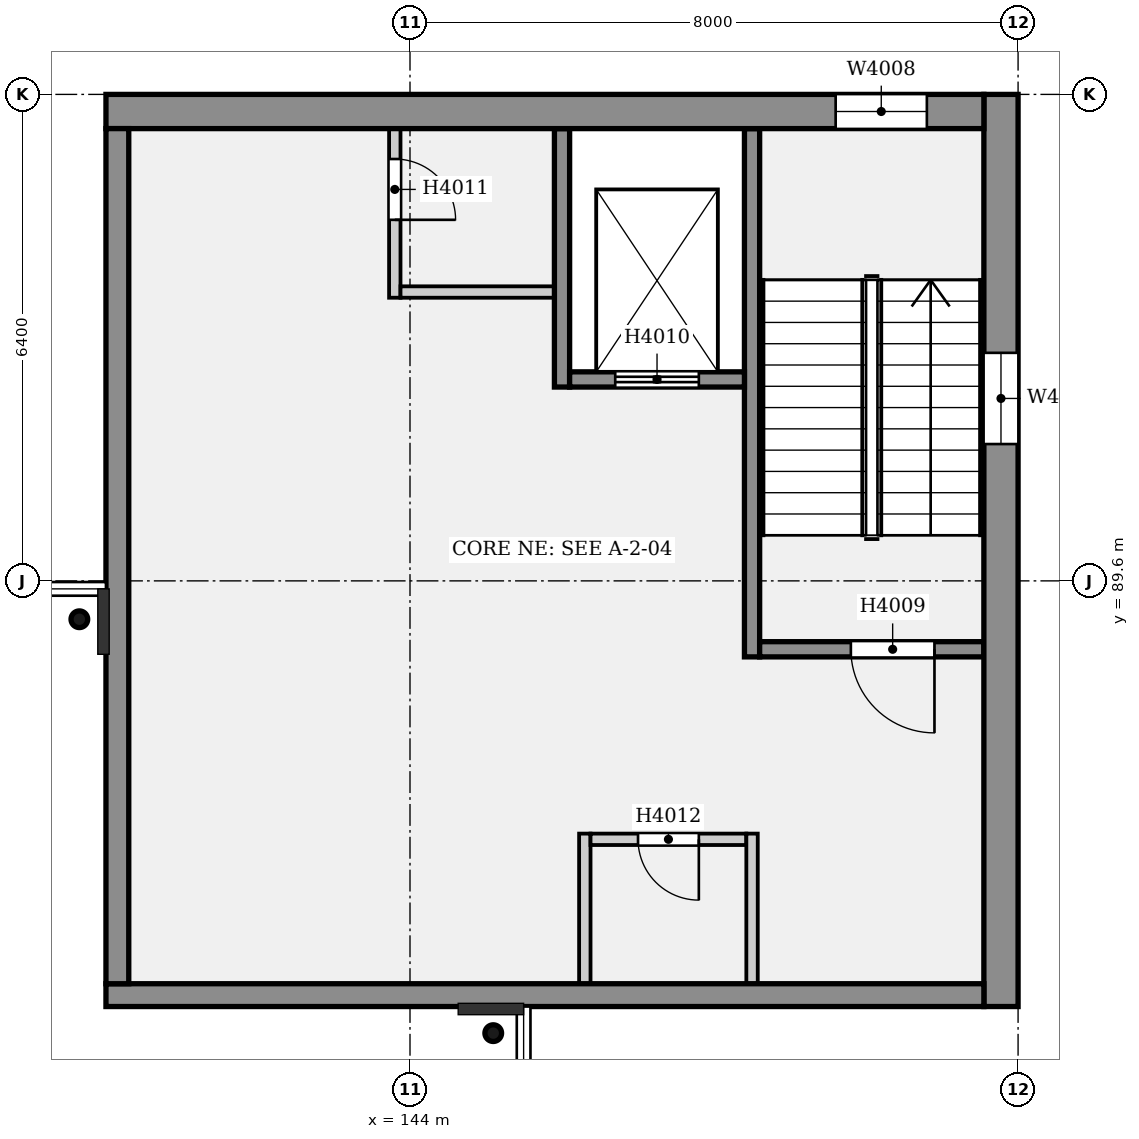
"""IFC4 building model, lengths in metres.
Left out: names, types, materials, properties, quantities, classifications, styles, units other than length and angle.
Written with IfcOpenShell. Run it as: python <this file> out.ifc"""

import sys

from ifc_helpers import new_model, si_unit, direction, frame, frame_2d, origin, origin_2d, place, context, subcontext, project, spatial, rectangle, hollow_circle, extrude, element, fill, save


model = new_model("IFC4")
c1 = context("Model", 3, precision=1e-05, world=origin(), true_north=direction((0.0, 1.0)))
c2 = subcontext(c1, "Body", "Model", "MODEL_VIEW")
j1 = project(units=[si_unit("LENGTHUNIT", "METRE"), si_unit("PLANEANGLEUNIT", "RADIAN")], contexts=[c1])
p1 = place(None, origin())
s1 = spatial("IfcSite", under=j1, at=p1, CompositionType="ELEMENT")
p2 = place(p1, origin())
s2 = spatial("IfcBuilding", under=s1, at=p2, CompositionType="ELEMENT")
p3 = place(p2, frame((0.0, 0.0, 18.2)))
s3 = spatial("IfcBuildingStorey", under=s2, at=p3, CompositionType="ELEMENT", Elevation=18.2)
p4 = place(p3, frame((151.775, 96.0, 0.0), z_axis=(0.0, 0.0, 1.0), x_axis=(0.0, -1.0, 0.0)))
e1 = element("IfcWall", 1, at=p4, inside=s3, PredefinedType="ELEMENTEDWALL", context=c2, shape_type="SweptSolid", body=[
    extrude(rectangle(XDim=12.0, YDim=0.45, at=frame_2d((6.0, 0.0))), origin(), (0.0, 0.0, 1.0), 4.4),
])
p5 = place(p4, frame((3.4, 0.0, 0.6)))
e2 = element("IfcOpeningElement", 2, at=p5, cuts=e1, PredefinedType="OPENING", context=c2, shape_type="SweptSolid", body=[
    extrude(rectangle(XDim=1.2, YDim=3.0, at=frame_2d((0.6, 1.5))), frame((0.0, 0.235, 0.0), z_axis=(0.0, -1.0, 0.0), x_axis=(1.0, 0.0, 0.0)), (0.0, 0.0, 1.0), 0.47),
])
p6 = place(p3, frame((151.55, 95.775, 0.0), z_axis=(0.0, 0.0, 1.0), x_axis=(-1.0, 0.0, 0.0)))
e3 = element("IfcWall", 3, at=p6, inside=s3, PredefinedType="ELEMENTEDWALL", context=c2, shape_type="SweptSolid", body=[
    extrude(rectangle(XDim=11.55, YDim=0.45, at=frame_2d((5.775, 0.0))), origin(), (0.0, 0.0, 1.0), 4.4),
])
p7 = place(p6, frame((0.75, 0.0, 0.6)))
e4 = element("IfcOpeningElement", 4, at=p7, cuts=e3, PredefinedType="OPENING", context=c2, shape_type="SweptSolid", body=[
    extrude(rectangle(XDim=1.2, YDim=3.0, at=frame_2d((0.6, 1.5))), frame((0.0, 0.235, 0.0), z_axis=(0.0, -1.0, 0.0), x_axis=(1.0, 0.0, 0.0)), (0.0, 0.0, 1.0), 0.47),
])
p8 = place(p3, frame((140.15, 95.55, 0.0), z_axis=(0.0, 0.0, 1.0), x_axis=(0.0, -1.0, 0.0)))
e5 = element("IfcWall", 5, at=p8, inside=s3, PredefinedType="SOLIDWALL", context=c2, shape_type="SweptSolid", body=[
    extrude(rectangle(XDim=11.25, YDim=0.3, at=frame_2d((5.625, 0.0))), origin(), (0.0, 0.0, 1.0), 4.4),
])
p9 = place(p3, frame((151.55, 84.15, 0.0), z_axis=(0.0, 0.0, 1.0), x_axis=(-1.0, 0.0, 0.0)))
e6 = element("IfcWall", 6, at=p9, inside=s3, PredefinedType="SOLIDWALL", context=c2, shape_type="SweptSolid", body=[
    extrude(rectangle(XDim=11.55, YDim=0.3, at=frame_2d((5.775, 0.0))), origin(), (0.0, 0.0, 1.0), 4.4),
])
for number, where, z_axis, x_axis in (
    (7, (139.65, 89.095, 0.0), (0.0, -0.199, 0.98), (1.0, 0.0, 0.0)),
    (8, (145.095, 83.65, 0.0), (-0.199, 0.0, 0.98), (0.0, -1.0, 0.0)),
):
    element("IfcColumn", number, at=place(p3, frame(where, z_axis=z_axis, x_axis=x_axis)), inside=s3, PredefinedType="COLUMN", context=c2, shape_type="SweptSolid", body=[
        extrude(hollow_circle(Radius=0.11, WallThickness=0.013, at=origin_2d()), origin(), (0.0, 0.0, 1.0), 3.776),
    ])
p10 = place(p3, frame((148.5, 95.55, 0.0), z_axis=(0.0, 0.0, 1.0), x_axis=(0.0, -1.0, 0.0)))
e9 = element("IfcWall", 9, at=p10, inside=s3, PredefinedType="SOLIDWALL", context=c2, shape_type="SweptSolid", body=[
    extrude(rectangle(XDim=6.95, YDim=0.2, at=frame_2d((3.475, 0.0))), origin(), (0.0, 0.0, 1.0), 4.4),
])
p11 = place(p3, frame((151.55, 88.7, 0.0), z_axis=(0.0, 0.0, 1.0), x_axis=(-1.0, 0.0, 0.0)))
e10 = element("IfcWall", 10, at=p11, inside=s3, PredefinedType="SOLIDWALL", context=c2, shape_type="SweptSolid", body=[
    extrude(rectangle(XDim=2.95, YDim=0.2, at=frame_2d((1.475, 0.0))), origin(), (0.0, 0.0, 1.0), 4.4),
])
p12 = place(p11, frame((0.65, 0.0, 0.0)))
e11 = element("IfcOpeningElement", 11, at=p12, cuts=e10, PredefinedType="OPENING", context=c2, shape_type="SweptSolid", body=[
    extrude(rectangle(XDim=1.1, YDim=2.1, at=frame_2d((0.55, 1.05))), frame((0.0, 0.11, 0.0), z_axis=(0.0, -1.0, 0.0), x_axis=(1.0, 0.0, 0.0)), (0.0, 0.0, 1.0), 0.22),
])
p13 = place(p3, frame((146.0, 95.55, 0.0), z_axis=(0.0, 0.0, 1.0), x_axis=(0.0, -1.0, 0.0)))
e12 = element("IfcWall", 12, at=p13, inside=s3, PredefinedType="SOLIDWALL", context=c2, shape_type="SweptSolid", body=[
    extrude(rectangle(XDim=3.4, YDim=0.2, at=frame_2d((1.7, 0.0))), origin(), (0.0, 0.0, 1.0), 4.4),
])
p14 = place(p3, frame((148.4, 92.25, 0.0), z_axis=(0.0, 0.0, 1.0), x_axis=(-1.0, 0.0, 0.0)))
e13 = element("IfcWall", 13, at=p14, inside=s3, PredefinedType="SOLIDWALL", context=c2, shape_type="SweptSolid", body=[
    extrude(rectangle(XDim=2.3, YDim=0.2, at=frame_2d((1.15, 0.0))), origin(), (0.0, 0.0, 1.0), 4.4),
])
p15 = place(p14, frame((0.6, 0.0, 0.0)))
e14 = element("IfcOpeningElement", 14, at=p15, cuts=e13, PredefinedType="OPENING", context=c2, shape_type="SweptSolid", body=[
    extrude(rectangle(XDim=1.1, YDim=2.1, at=frame_2d((0.55, 1.05))), frame((0.0, 0.11, 0.0), z_axis=(0.0, -1.0, 0.0), x_axis=(1.0, 0.0, 0.0)), (0.0, 0.0, 1.0), 0.22),
])
p16 = place(p3, frame((145.9, 93.4, 0.0), z_axis=(0.0, 0.0, 1.0), x_axis=(-1.0, 0.0, 0.0)))
e15 = element("IfcWall", 15, at=p16, inside=s3, PredefinedType="PARTITIONING", context=c2, shape_type="SweptSolid", body=[
    extrude(rectangle(XDim=2.025, YDim=0.15, at=frame_2d((1.012, 0.0))), origin(), (0.0, 0.0, 1.0), 4.15),
])
p17 = place(p3, frame((143.8, 95.55, 0.0), z_axis=(0.0, 0.0, 1.0), x_axis=(0.0, -1.0, 0.0)))
e16 = element("IfcWall", 16, at=p17, inside=s3, PredefinedType="PARTITIONING", context=c2, shape_type="SweptSolid", body=[
    extrude(rectangle(XDim=2.225, YDim=0.15, at=frame_2d((1.113, 0.0))), origin(), (0.0, 0.0, 1.0), 4.15),
])
p18 = place(p17, frame((0.4, 0.0, 0.0)))
e17 = element("IfcOpeningElement", 17, at=p18, cuts=e16, PredefinedType="OPENING", context=c2, shape_type="SweptSolid", body=[
    extrude(rectangle(XDim=0.8, YDim=2.1, at=frame_2d((0.4, 1.05))), frame((0.0, 0.085, 0.0), z_axis=(0.0, -1.0, 0.0), x_axis=(1.0, 0.0, 0.0)), (0.0, 0.0, 1.0), 0.17),
])
p19 = place(p3, frame((148.425, 86.2, 0.0), z_axis=(0.0, 0.0, 1.0), x_axis=(-1.0, 0.0, 0.0)))
e18 = element("IfcWall", 18, at=p19, inside=s3, PredefinedType="PARTITIONING", context=c2, shape_type="SweptSolid", body=[
    extrude(rectangle(XDim=2.05, YDim=0.15, at=frame_2d((1.025, 0.0))), origin(), (0.0, 0.0, 1.0), 4.15),
])
p20 = place(p19, frame((0.625, 0.0, 0.0)))
e19 = element("IfcOpeningElement", 19, at=p20, cuts=e18, PredefinedType="OPENING", context=c2, shape_type="SweptSolid", body=[
    extrude(rectangle(XDim=0.8, YDim=2.1, at=frame_2d((0.4, 1.05))), frame((0.0, 0.085, 0.0), z_axis=(0.0, -1.0, 0.0), x_axis=(1.0, 0.0, 0.0)), (0.0, 0.0, 1.0), 0.17),
])
for number, where, z_axis, x_axis in (
    (20, (148.5, 86.275, 0.0), (0.0, 0.0, 1.0), (0.0, -1.0, 0.0)),
    (21, (146.3, 86.275, 0.0), (0.0, 0.0, 1.0), (0.0, -1.0, 0.0)),
):
    element("IfcWall", number, at=place(p3, frame(where, z_axis=z_axis, x_axis=x_axis)), inside=s3, PredefinedType="PARTITIONING", context=c2, shape_type="SweptSolid", body=[
        extrude(rectangle(XDim=1.975, YDim=0.15, at=frame_2d((0.987, 0.0))), origin(), (0.0, 0.0, 1.0), 4.15),
    ])
p21 = place(p12, origin())
e22 = element("IfcDoor", 22, at=p21, inside=s3, OperationType="SINGLE_SWING_LEFT", PredefinedType="DOOR", context=c2, shape_type="SweptSolid", body=[
    extrude(rectangle(XDim=1.1, YDim=2.1, at=frame_2d((0.55, 1.05))), frame((0.0, 0.025, 0.0), z_axis=(0.0, -1.0, 0.0), x_axis=(1.0, 0.0, 0.0)), (0.0, 0.0, 1.0), 0.05),
])
fill(e11, e22)
p22 = place(p15, origin())
e23 = element("IfcDoor", 23, at=p22, inside=s3, OperationType="DOUBLE_DOOR_SLIDING", PredefinedType="DOOR", context=c2, shape_type="SweptSolid", body=[
    extrude(rectangle(XDim=1.1, YDim=2.1, at=frame_2d((0.55, 1.05))), frame((0.0, 0.025, 0.0), z_axis=(0.0, -1.0, 0.0), x_axis=(1.0, 0.0, 0.0)), (0.0, 0.0, 1.0), 0.05),
])
fill(e14, e23)
p23 = place(p18, origin())
e24 = element("IfcDoor", 24, at=p23, inside=s3, OperationType="SINGLE_SWING_RIGHT", PredefinedType="DOOR", context=c2, shape_type="SweptSolid", body=[
    extrude(rectangle(XDim=0.8, YDim=2.1, at=frame_2d((0.4, 1.05))), frame((0.0, 0.025, 0.0), z_axis=(0.0, -1.0, 0.0), x_axis=(1.0, 0.0, 0.0)), (0.0, 0.0, 1.0), 0.05),
])
fill(e17, e24)
p24 = place(p20, origin())
e25 = element("IfcDoor", 25, at=p24, inside=s3, OperationType="SINGLE_SWING_LEFT", PredefinedType="DOOR", context=c2, shape_type="SweptSolid", body=[
    extrude(rectangle(XDim=0.8, YDim=2.1, at=frame_2d((0.4, 1.05))), frame((0.0, 0.025, 0.0), z_axis=(0.0, -1.0, 0.0), x_axis=(1.0, 0.0, 0.0)), (0.0, 0.0, 1.0), 0.05),
])
fill(e19, e25)
p25 = place(p5, origin())
e26 = element("IfcWindow", 26, at=p25, inside=s3, PartitioningType="SINGLE_PANEL", PredefinedType="WINDOW", context=c2, shape_type="SweptSolid", body=[
    extrude(rectangle(XDim=1.2, YDim=3.0, at=frame_2d((0.6, 1.5))), frame((0.0, 0.03, 0.0), z_axis=(0.0, -1.0, 0.0), x_axis=(1.0, 0.0, 0.0)), (0.0, 0.0, 1.0), 0.06),
])
fill(e2, e26)
p26 = place(p7, origin())
e27 = element("IfcWindow", 27, at=p26, inside=s3, PartitioningType="SINGLE_PANEL", PredefinedType="WINDOW", context=c2, shape_type="SweptSolid", body=[
    extrude(rectangle(XDim=1.2, YDim=3.0, at=frame_2d((0.6, 1.5))), frame((0.0, 0.03, 0.0), z_axis=(0.0, -1.0, 0.0), x_axis=(1.0, 0.0, 0.0)), (0.0, 0.0, 1.0), 0.06),
])
fill(e4, e27)
save(model, sys.argv[1])
